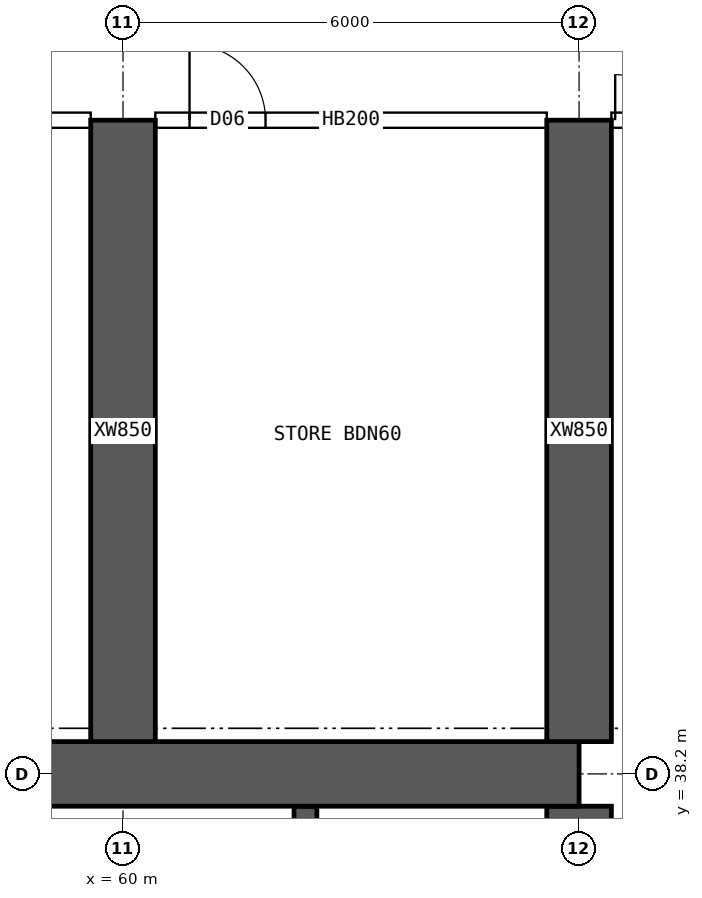
"""IFC4 building model, lengths in metres.
Left out: names, types, materials, properties, quantities, classifications, styles, units other than length and angle.
Written with IfcOpenShell. Run it as: python <this file> out.ifc"""

import sys

from ifc_helpers import new_model, si_unit, direction, frame, frame_2d, origin, place, context, subcontext, project, spatial, rectangle, extrude, element, fill, save


model = new_model("IFC4")
c1 = context("Model", 3, precision=1e-05, world=origin(), true_north=direction((0.0, 1.0)))
c2 = subcontext(c1, "Body", "Model", "MODEL_VIEW")
j1 = project(units=[si_unit("LENGTHUNIT", "METRE"), si_unit("PLANEANGLEUNIT", "RADIAN")], contexts=[c1])
p1 = place(None, origin())
s1 = spatial("IfcSite", under=j1, at=p1, CompositionType="ELEMENT")
p2 = place(p1, origin())
s2 = spatial("IfcBuilding", under=s1, at=p2, CompositionType="ELEMENT")
p3 = place(p2, frame((0.0, 0.0, 148.6)))
s3 = spatial("IfcBuildingStorey", under=s2, at=p3, CompositionType="ELEMENT", Elevation=148.6)
p4 = place(p3, frame((18.0, 38.2, 0.0), z_axis=(0.0, 0.0, 1.0), x_axis=(1.0, 0.0, 0.0)))
e1 = element("IfcWall", 1, at=p4, inside=s3, PredefinedType="SHEAR", context=c2, shape_type="SweptSolid", body=[
    extrude(rectangle(XDim=48.0, YDim=0.85, at=frame_2d((24.0, 0.0))), origin(), (0.0, 0.0, 1.0), 3.75),
])
p5 = place(p3, frame((66.0, 26.225, 0.0), z_axis=(0.0, 0.0, 1.0), x_axis=(0.0, 1.0, 0.0)))
e2 = element("IfcWall", 2, at=p5, inside=s3, PredefinedType="SHEAR", context=c2, shape_type="SweptSolid", body=[
    extrude(rectangle(XDim=11.55, YDim=0.85, at=frame_2d((5.775, 0.0))), origin(), (0.0, 0.0, 1.0), 3.75),
])
p6 = place(p5, frame((5.075, 0.0, 0.0)))
e3 = element("IfcOpeningElement", 3, at=p6, cuts=e2, PredefinedType="OPENING", context=c2, shape_type="SweptSolid", body=[
    extrude(rectangle(XDim=1.2, YDim=2.1, at=frame_2d((0.6, 1.05))), frame((0.0, 0.435, 0.0), z_axis=(0.0, -1.0, 0.0), x_axis=(1.0, 0.0, 0.0)), (0.0, 0.0, 1.0), 0.87),
])
p7 = place(p3, frame((62.4, 34.75, 0.0), z_axis=(0.0, 0.0, 1.0), x_axis=(0.0, 1.0, 0.0)))
e4 = element("IfcWall", 4, at=p7, inside=s3, PredefinedType="SHEAR", context=c2, shape_type="SweptSolid", body=[
    extrude(rectangle(XDim=3.025, YDim=0.3, at=frame_2d((1.512, 0.0))), origin(), (0.0, 0.0, 1.0), 3.75),
])
for number, where, z_axis, x_axis in (
    (5, (60.0, 38.625, 0.0), (0.0, 0.0, 1.0), (0.0, 1.0, 0.0)),
    (6, (66.0, 38.625, 0.0), (0.0, 0.0, 1.0), (0.0, 1.0, 0.0)),
):
    element("IfcWall", number, at=place(p3, frame(where, z_axis=z_axis, x_axis=x_axis)), inside=s3, PredefinedType="SHEAR", context=c2, shape_type="SweptSolid", body=[
        extrude(rectangle(XDim=8.175, YDim=0.85, at=frame_2d((4.087, 0.0))), origin(), (0.0, 0.0, 1.0), 3.75),
    ])
p8 = place(p3, frame((54.425, 46.8, 0.0), z_axis=(0.0, 0.0, 1.0), x_axis=(1.0, 0.0, 0.0)))
e7 = element("IfcWall", 7, at=p8, inside=s3, PredefinedType="SOLIDWALL", context=c2, shape_type="SweptSolid", body=[
    extrude(rectangle(XDim=5.15, YDim=0.2, at=frame_2d((2.575, 0.0))), origin(), (0.0, 0.0, 1.0), 3.5),
])
p9 = place(p8, frame((0.35, 0.0, 0.0)))
e8 = element("IfcOpeningElement", 8, at=p9, cuts=e7, PredefinedType="OPENING", context=c2, shape_type="SweptSolid", body=[
    extrude(rectangle(XDim=0.9, YDim=2.1, at=frame_2d((0.45, 1.05))), frame((0.0, 0.11, 0.0), z_axis=(0.0, -1.0, 0.0), x_axis=(1.0, 0.0, 0.0)), (0.0, 0.0, 1.0), 0.22),
])
p10 = place(p8, frame((2.775, 0.0, 0.0)))
e9 = element("IfcOpeningElement", 9, at=p10, cuts=e7, PredefinedType="OPENING", context=c2, shape_type="SweptSolid", body=[
    extrude(rectangle(XDim=0.9, YDim=2.1, at=frame_2d((0.45, 1.05))), frame((0.0, 0.11, 0.0), z_axis=(0.0, -1.0, 0.0), x_axis=(1.0, 0.0, 0.0)), (0.0, 0.0, 1.0), 0.22),
])
p11 = place(p3, frame((60.425, 46.8, 0.0), z_axis=(0.0, 0.0, 1.0), x_axis=(1.0, 0.0, 0.0)))
e10 = element("IfcWall", 10, at=p11, inside=s3, PredefinedType="SOLIDWALL", context=c2, shape_type="SweptSolid", body=[
    extrude(rectangle(XDim=5.15, YDim=0.2, at=frame_2d((2.575, 0.0))), origin(), (0.0, 0.0, 1.0), 3.5),
])
p12 = place(p11, frame((0.45, 0.0, 0.0)))
e11 = element("IfcOpeningElement", 11, at=p12, cuts=e10, PredefinedType="OPENING", context=c2, shape_type="SweptSolid", body=[
    extrude(rectangle(XDim=1.0, YDim=2.1, at=frame_2d((0.5, 1.05))), frame((0.0, 0.11, 0.0), z_axis=(0.0, -1.0, 0.0), x_axis=(1.0, 0.0, 0.0)), (0.0, 0.0, 1.0), 0.22),
])
p13 = place(p3, frame((66.425, 46.8, 0.0), z_axis=(0.0, 0.0, 1.0), x_axis=(1.0, 0.0, 0.0)))
e12 = element("IfcWall", 12, at=p13, inside=s3, PredefinedType="SOLIDWALL", context=c2, shape_type="SweptSolid", body=[
    extrude(rectangle(XDim=1.975, YDim=0.2, at=frame_2d((0.987, 0.0))), origin(), (0.0, 0.0, 1.0), 3.5),
])
p14 = place(p13, frame((0.05, 0.0, 0.0)))
e13 = element("IfcOpeningElement", 13, at=p14, cuts=e12, PredefinedType="OPENING", context=c2, shape_type="SweptSolid", body=[
    extrude(rectangle(XDim=1.2, YDim=2.1, at=frame_2d((0.6, 1.05))), frame((0.0, 0.11, 0.0), z_axis=(0.0, -1.0, 0.0), x_axis=(1.0, 0.0, 0.0)), (0.0, 0.0, 1.0), 0.22),
])
p15 = place(p14, origin())
e14 = element("IfcDoor", 14, at=p15, inside=s3, OperationType="DOUBLE_DOOR_SINGLE_SWING", PredefinedType="DOOR", context=c2, shape_type="SweptSolid", body=[
    extrude(rectangle(XDim=1.2, YDim=2.1, at=frame_2d((0.6, 1.05))), frame((0.0, 0.025, 0.0), z_axis=(0.0, -1.0, 0.0), x_axis=(1.0, 0.0, 0.0)), (0.0, 0.0, 1.0), 0.05),
])
fill(e13, e14)
p16 = place(p12, origin())
e15 = element("IfcDoor", 15, at=p16, inside=s3, OperationType="SINGLE_SWING_LEFT", PredefinedType="DOOR", context=c2, shape_type="SweptSolid", body=[
    extrude(rectangle(XDim=1.0, YDim=2.1, at=frame_2d((0.5, 1.05))), frame((0.0, 0.025, 0.0), z_axis=(0.0, -1.0, 0.0), x_axis=(1.0, 0.0, 0.0)), (0.0, 0.0, 1.0), 0.05),
])
fill(e11, e15)
save(model, sys.argv[1])
